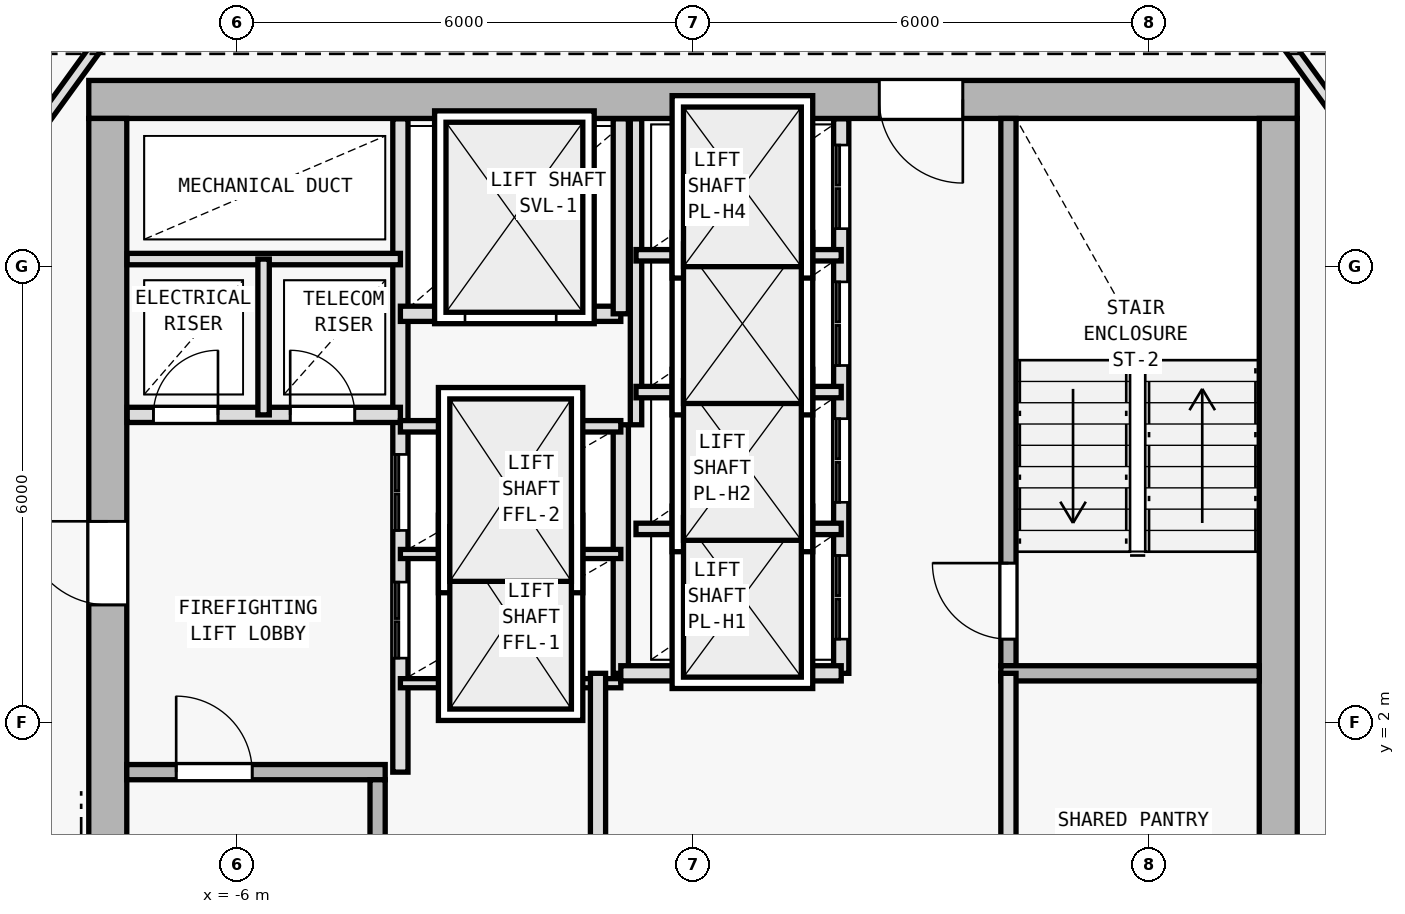
"""IFC4 building model, lengths in metres.
Left out: names, types, materials, properties, quantities, classifications, styles, units other than length and angle.
Written with IfcOpenShell. Run it as: python <this file> out.ifc"""

import sys

from ifc_helpers import new_model, si_unit, direction, frame, frame_2d, origin, origin_2d, place, context, subcontext, project, spatial, rectangle, i_section, extrude, element, fill, save


model = new_model("IFC4")
c1 = context("Model", 3, precision=1e-05, world=origin(), true_north=direction((0.0, 1.0)))
c2 = subcontext(c1, "Body", "Model", "MODEL_VIEW")
j1 = project(units=[si_unit("LENGTHUNIT", "METRE"), si_unit("PLANEANGLEUNIT", "RADIAN")], contexts=[c1])
p1 = place(None, origin())
s1 = spatial("IfcSite", under=j1, at=p1, CompositionType="ELEMENT")
p2 = place(p1, origin())
s2 = spatial("IfcBuilding", under=s1, at=p2, CompositionType="ELEMENT")
p3 = place(p2, frame((0.0, 0.0, 294.0)))
s3 = spatial("IfcBuildingStorey", under=s2, at=p3, CompositionType="ELEMENT", Elevation=294.0)
for number, where, z_axis, x_axis in (
    (1, (7.7, 10.2, 0.0), (0.0, 0.0, 1.0), (1.0, 0.0, 0.0)),
    (2, (-7.7, 10.2, 0.0), (0.0, 0.0, 1.0), (1.0, 0.0, 0.0)),
    (3, (7.7, 0.4, 0.0), (0.0, 0.0, 1.0), (1.0, 0.0, 0.0)),
    (4, (-7.7, 2.0, 0.0), (0.0, 0.0, 1.0), (1.0, 0.0, 0.0)),
):
    element("IfcColumn", number, at=place(p3, frame(where, z_axis=z_axis, x_axis=x_axis)), inside=s3, PredefinedType="COLUMN", context=c2, shape_type="SweptSolid", body=[
        extrude(i_section(OverallWidth=0.374, OverallDepth=0.372, WebThickness=0.012, FlangeThickness=0.02, FilletRadius=0.015, at=origin_2d()), origin(), (0.0, 0.0, 1.0), 3.6),
    ])
p4 = place(p3, frame((7.95, 10.2, 0.0), z_axis=(0.0, 0.0, 1.0), x_axis=(-1.0, 0.0, 0.0)))
e5 = element("IfcWall", 5, at=p4, inside=s3, PredefinedType="SHEAR", context=c2, shape_type="SweptSolid", body=[
    extrude(rectangle(XDim=15.9, YDim=0.5, at=frame_2d((7.95, 0.0))), origin(), (0.0, 0.0, 1.0), 3.34),
])
p5 = place(p4, frame((4.4, 0.0, 0.0)))
e6 = element("IfcOpeningElement", 6, at=p5, cuts=e5, PredefinedType="OPENING", context=c2, shape_type="SweptSolid", body=[
    extrude(rectangle(XDim=1.1, YDim=2.15, at=frame_2d((0.55, 1.075))), frame((0.0, 0.26, 0.0), z_axis=(0.0, -1.0, 0.0), x_axis=(1.0, 0.0, 0.0)), (0.0, 0.0, 1.0), 0.52),
])
p6 = place(p3, frame((-7.7, -9.15, 0.0), z_axis=(0.0, 0.0, 1.0), x_axis=(0.0, 1.0, 0.0)))
e7 = element("IfcWall", 7, at=p6, inside=s3, PredefinedType="SHEAR", context=c2, shape_type="SweptSolid", body=[
    extrude(rectangle(XDim=19.1, YDim=0.5, at=frame_2d((9.55, 0.0))), origin(), (0.0, 0.0, 1.0), 3.34),
])
p7 = place(p6, frame((12.7, 0.0, 0.0)))
e8 = element("IfcOpeningElement", 8, at=p7, cuts=e7, PredefinedType="OPENING", context=c2, shape_type="SweptSolid", body=[
    extrude(rectangle(XDim=1.1, YDim=2.15, at=frame_2d((0.55, 1.075))), frame((0.0, 0.26, 0.0), z_axis=(0.0, -1.0, 0.0), x_axis=(1.0, 0.0, 0.0)), (0.0, 0.0, 1.0), 0.52),
])
p8 = place(p3, frame((7.7, 9.95, 0.0), z_axis=(0.0, 0.0, 1.0), x_axis=(0.0, -1.0, 0.0)))
e9 = element("IfcWall", 9, at=p8, inside=s3, PredefinedType="SHEAR", context=c2, shape_type="SweptSolid", body=[
    extrude(rectangle(XDim=19.1, YDim=0.5, at=frame_2d((9.55, 0.0))), origin(), (0.0, 0.0, 1.0), 3.34),
])
p9 = place(p3, frame((-7.45, 1.35, 0.0), z_axis=(0.0, 0.0, 1.0), x_axis=(1.0, 0.0, 0.0)))
e10 = element("IfcWall", 10, at=p9, inside=s3, PredefinedType="SOLIDWALL", context=c2, shape_type="SweptSolid", body=[
    extrude(rectangle(XDim=3.4, YDim=0.2, at=frame_2d((1.7, 0.0))), origin(), (0.0, 0.0, 1.0), 3.34),
])
p10 = place(p9, frame((0.65, 0.0, 0.0)))
e11 = element("IfcOpeningElement", 11, at=p10, cuts=e10, PredefinedType="OPENING", context=c2, shape_type="SweptSolid", body=[
    extrude(rectangle(XDim=1.0, YDim=2.15, at=frame_2d((0.5, 1.075))), frame((0.0, 0.11, 0.0), z_axis=(0.0, -1.0, 0.0), x_axis=(1.0, 0.0, 0.0)), (0.0, 0.0, 1.0), 0.22),
])
p11 = place(p3, frame((-4.15, -5.95, 0.0), z_axis=(0.0, 0.0, 1.0), x_axis=(0.0, 1.0, 0.0)))
e12 = element("IfcWall", 12, at=p11, inside=s3, PredefinedType="SOLIDWALL", context=c2, shape_type="SweptSolid", body=[
    extrude(rectangle(XDim=7.2, YDim=0.2, at=frame_2d((3.6, 0.0))), origin(), (0.0, 0.0, 1.0), 3.34),
])
p12 = place(p3, frame((-3.85, 1.35, 0.0), z_axis=(0.0, 0.0, 1.0), x_axis=(0.0, 1.0, 0.0)))
e13 = element("IfcWall", 13, at=p12, inside=s3, PredefinedType="SOLIDWALL", context=c2, shape_type="SweptSolid", body=[
    extrude(rectangle(XDim=8.595, YDim=0.2, at=frame_2d((4.297, 0.0))), origin(), (0.0, 0.0, 1.0), 3.34),
])
p13 = place(p12, frame((1.5, 0.0, 0.0)))
e14 = element("IfcOpeningElement", 14, at=p13, cuts=e13, PredefinedType="OPENING", context=c2, shape_type="SweptSolid", body=[
    extrude(rectangle(XDim=1.0, YDim=2.15, at=frame_2d((0.5, 1.075))), frame((0.0, 0.11, 0.0), z_axis=(0.0, -1.0, 0.0), x_axis=(1.0, 0.0, 0.0)), (0.0, 0.0, 1.0), 0.22),
])
p14 = place(p12, frame((3.18, 0.0, 0.0)))
e15 = element("IfcOpeningElement", 15, at=p14, cuts=e13, PredefinedType="OPENING", context=c2, shape_type="SweptSolid", body=[
    extrude(rectangle(XDim=1.0, YDim=2.15, at=frame_2d((0.5, 1.075))), frame((0.0, 0.11, 0.0), z_axis=(0.0, -1.0, 0.0), x_axis=(1.0, 0.0, 0.0)), (0.0, 0.0, 1.0), 0.22),
])
p15 = place(p3, frame((-7.445, 6.05, 0.0), z_axis=(0.0, 0.0, 1.0), x_axis=(1.0, 0.0, 0.0)))
e16 = element("IfcWall", 16, at=p15, inside=s3, PredefinedType="SOLIDWALL", context=c2, shape_type="SweptSolid", body=[
    extrude(rectangle(XDim=3.595, YDim=0.2, at=frame_2d((1.797, 0.0))), origin(), (0.0, 0.0, 1.0), 3.34),
])
p16 = place(p15, frame((0.345, 0.0, 0.0)))
e17 = element("IfcOpeningElement", 17, at=p16, cuts=e16, PredefinedType="OPENING", context=c2, shape_type="SweptSolid", body=[
    extrude(rectangle(XDim=0.85, YDim=2.1, at=frame_2d((0.425, 1.05))), frame((0.0, 0.11, 0.0), z_axis=(0.0, -1.0, 0.0), x_axis=(1.0, 0.0, 0.0)), (0.0, 0.0, 1.0), 0.22),
])
p17 = place(p15, frame((2.145, 0.0, 0.0)))
e18 = element("IfcOpeningElement", 18, at=p17, cuts=e16, PredefinedType="OPENING", context=c2, shape_type="SweptSolid", body=[
    extrude(rectangle(XDim=0.85, YDim=2.1, at=frame_2d((0.425, 1.05))), frame((0.0, 0.11, 0.0), z_axis=(0.0, -1.0, 0.0), x_axis=(1.0, 0.0, 0.0)), (0.0, 0.0, 1.0), 0.22),
])
p18 = place(p3, frame((-7.445, 8.1, 0.0), z_axis=(0.0, 0.0, 1.0), x_axis=(1.0, 0.0, 0.0)))
e19 = element("IfcWall", 19, at=p18, inside=s3, PredefinedType="PARTITIONING", context=c2, shape_type="SweptSolid", body=[
    extrude(rectangle(XDim=3.595, YDim=0.15, at=frame_2d((1.797, 0.0))), origin(), (0.0, 0.0, 1.0), 3.34),
])
p19 = place(p3, frame((-5.65, 6.05, 0.0), z_axis=(0.0, 0.0, 1.0), x_axis=(0.0, 1.0, 0.0)))
e20 = element("IfcWall", 20, at=p19, inside=s3, PredefinedType="PARTITIONING", context=c2, shape_type="SweptSolid", body=[
    extrude(rectangle(XDim=2.05, YDim=0.15, at=frame_2d((1.025, 0.0))), origin(), (0.0, 0.0, 1.0), 3.34),
])
p20 = place(p3, frame((4.15, 2.75, 0.0), z_axis=(0.0, 0.0, 1.0), x_axis=(0.0, 1.0, 0.0)))
e21 = element("IfcWall", 21, at=p20, inside=s3, PredefinedType="SOLIDWALL", context=c2, shape_type="SweptSolid", body=[
    extrude(rectangle(XDim=7.2, YDim=0.2, at=frame_2d((3.6, 0.0))), origin(), (0.0, 0.0, 1.0), 3.34),
])
p21 = place(p20, frame((0.35, 0.0, 0.0)))
e22 = element("IfcOpeningElement", 22, at=p21, cuts=e21, PredefinedType="OPENING", context=c2, shape_type="SweptSolid", body=[
    extrude(rectangle(XDim=1.0, YDim=2.15, at=frame_2d((0.5, 1.075))), frame((0.0, 0.11, 0.0), z_axis=(0.0, -1.0, 0.0), x_axis=(1.0, 0.0, 0.0)), (0.0, 0.0, 1.0), 0.22),
])
p22 = place(p3, frame((4.05, 2.65, 0.0), z_axis=(0.0, 0.0, 1.0), x_axis=(1.0, 0.0, 0.0)))
e23 = element("IfcWall", 23, at=p22, inside=s3, PredefinedType="SOLIDWALL", context=c2, shape_type="SweptSolid", body=[
    extrude(rectangle(XDim=3.4, YDim=0.2, at=frame_2d((1.7, 0.0))), origin(), (0.0, 0.0, 1.0), 3.34),
])
p23 = place(p3, frame((-0.95, 2.65, 0.0), z_axis=(0.0, 0.0, 1.0), x_axis=(0.0, 1.0, 0.0)))
e24 = element("IfcWall", 24, at=p23, inside=s3, PredefinedType="SOLIDWALL", context=c2, shape_type="SweptSolid", body=[
    extrude(rectangle(XDim=3.27, YDim=0.2, at=frame_2d((1.635, 0.0))), origin(), (0.0, 0.0, 1.0), 3.34),
])
for number, where, z_axis, x_axis in (
    (25, (-3.85, 2.52, 0.0), (0.0, 0.0, 1.0), (1.0, 0.0, 0.0)),
    (26, (-3.85, 4.22, 0.0), (0.0, 0.0, 1.0), (1.0, 0.0, 0.0)),
):
    element("IfcWall", number, at=place(p3, frame(where, z_axis=z_axis, x_axis=x_axis)), inside=s3, PredefinedType="PARTITIONING", context=c2, shape_type="SweptSolid", body=[
        extrude(rectangle(XDim=2.9, YDim=0.12, at=frame_2d((1.45, 0.0))), origin(), (0.0, 0.0, 1.0), 3.34),
    ])
p24 = place(p3, frame((-3.85, 5.9, 0.0), z_axis=(0.0, 0.0, 1.0), x_axis=(1.0, 0.0, 0.0)))
e27 = element("IfcWall", 27, at=p24, inside=s3, PredefinedType="PARTITIONING", context=c2, shape_type="SweptSolid", body=[
    extrude(rectangle(XDim=2.9, YDim=0.15, at=frame_2d((1.45, 0.0))), origin(), (0.0, 0.0, 1.0), 3.34),
])
p25 = place(p3, frame((-3.85, 7.38, 0.0), z_axis=(0.0, 0.0, 1.0), x_axis=(1.0, 0.0, 0.0)))
e28 = element("IfcWall", 28, at=p25, inside=s3, PredefinedType="SOLIDWALL", context=c2, shape_type="SweptSolid", body=[
    extrude(rectangle(XDim=2.9, YDim=0.2, at=frame_2d((1.45, 0.0))), origin(), (0.0, 0.0, 1.0), 3.34),
])
p26 = place(p25, frame((0.85, 0.0, 0.0)))
e29 = element("IfcOpeningElement", 29, at=p26, cuts=e28, PredefinedType="OPENING", context=c2, shape_type="SweptSolid", body=[
    extrude(rectangle(XDim=1.2, YDim=2.2, at=frame_2d((0.6, 1.1))), frame((0.0, 0.11, 0.0), z_axis=(0.0, -1.0, 0.0), x_axis=(1.0, 0.0, 0.0)), (0.0, 0.0, 1.0), 0.22),
])
p27 = place(p3, frame((-0.95, 7.38, 0.0), z_axis=(0.0, 0.0, 1.0), x_axis=(0.0, 1.0, 0.0)))
e30 = element("IfcWall", 30, at=p27, inside=s3, PredefinedType="SOLIDWALL", context=c2, shape_type="SweptSolid", body=[
    extrude(rectangle(XDim=2.565, YDim=0.2, at=frame_2d((1.283, 0.0))), origin(), (0.0, 0.0, 1.0), 3.34),
])
p28 = place(p3, frame((4.15, -6.05, 0.0), z_axis=(0.0, 0.0, 1.0), x_axis=(0.0, 1.0, 0.0)))
e31 = element("IfcWall", 31, at=p28, inside=s3, PredefinedType="SOLIDWALL", context=c2, shape_type="SweptSolid", body=[
    extrude(rectangle(XDim=8.7, YDim=0.2, at=frame_2d((4.35, 0.0))), origin(), (0.0, 0.0, 1.0), 3.34),
])
p29 = place(p28, frame((3.6, 0.0, 0.0)))
e32 = element("IfcOpeningElement", 32, at=p29, cuts=e31, PredefinedType="OPENING", context=c2, shape_type="SweptSolid", body=[
    extrude(rectangle(XDim=0.95, YDim=2.1, at=frame_2d((0.475, 1.05))), frame((0.0, 0.11, 0.0), z_axis=(0.0, -1.0, 0.0), x_axis=(1.0, 0.0, 0.0)), (0.0, 0.0, 1.0), 0.22),
])
p30 = place(p3, frame((-1.25, -6.05, 0.0), z_axis=(0.0, 0.0, 1.0), x_axis=(0.0, 1.0, 0.0)))
e33 = element("IfcWall", 33, at=p30, inside=s3, PredefinedType="SOLIDWALL", context=c2, shape_type="SweptSolid", body=[
    extrude(rectangle(XDim=8.7, YDim=0.2, at=frame_2d((4.35, 0.0))), origin(), (0.0, 0.0, 1.0), 3.34),
])
p31 = place(p30, frame((3.4, 0.0, 0.0)))
e34 = element("IfcOpeningElement", 34, at=p31, cuts=e33, PredefinedType="OPENING", context=c2, shape_type="SweptSolid", body=[
    extrude(rectangle(XDim=0.95, YDim=2.1, at=frame_2d((0.475, 1.05))), frame((0.0, 0.11, 0.0), z_axis=(0.0, -1.0, 0.0), x_axis=(1.0, 0.0, 0.0)), (0.0, 0.0, 1.0), 0.22),
])
p32 = place(p3, frame((1.95, 2.65, 0.0), z_axis=(0.0, 0.0, 1.0), x_axis=(0.0, 1.0, 0.0)))
e35 = element("IfcWall", 35, at=p32, inside=s3, PredefinedType="SOLIDWALL", context=c2, shape_type="SweptSolid", body=[
    extrude(rectangle(XDim=7.295, YDim=0.2, at=frame_2d((3.647, 0.0))), origin(), (0.0, 0.0, 1.0), 3.34),
])
p33 = place(p32, frame((0.45, 0.0, 0.0)))
e36 = element("IfcOpeningElement", 36, at=p33, cuts=e35, PredefinedType="OPENING", context=c2, shape_type="SweptSolid", body=[
    extrude(rectangle(XDim=1.1, YDim=2.15, at=frame_2d((0.55, 1.075))), frame((0.0, 0.11, 0.0), z_axis=(0.0, -1.0, 0.0), x_axis=(1.0, 0.0, 0.0)), (0.0, 0.0, 1.0), 0.22),
])
p34 = place(p32, frame((2.25, 0.0, 0.0)))
e37 = element("IfcOpeningElement", 37, at=p34, cuts=e35, PredefinedType="OPENING", context=c2, shape_type="SweptSolid", body=[
    extrude(rectangle(XDim=1.1, YDim=2.15, at=frame_2d((0.55, 1.075))), frame((0.0, 0.11, 0.0), z_axis=(0.0, -1.0, 0.0), x_axis=(1.0, 0.0, 0.0)), (0.0, 0.0, 1.0), 0.22),
])
p35 = place(p32, frame((4.05, 0.0, 0.0)))
e38 = element("IfcOpeningElement", 38, at=p35, cuts=e35, PredefinedType="OPENING", context=c2, shape_type="SweptSolid", body=[
    extrude(rectangle(XDim=1.1, YDim=2.15, at=frame_2d((0.55, 1.075))), frame((0.0, 0.11, 0.0), z_axis=(0.0, -1.0, 0.0), x_axis=(1.0, 0.0, 0.0)), (0.0, 0.0, 1.0), 0.22),
])
p36 = place(p32, frame((5.85, 0.0, 0.0)))
e39 = element("IfcOpeningElement", 39, at=p36, cuts=e35, PredefinedType="OPENING", context=c2, shape_type="SweptSolid", body=[
    extrude(rectangle(XDim=1.1, YDim=2.15, at=frame_2d((0.55, 1.075))), frame((0.0, 0.11, 0.0), z_axis=(0.0, -1.0, 0.0), x_axis=(1.0, 0.0, 0.0)), (0.0, 0.0, 1.0), 0.22),
])
p37 = place(p3, frame((-0.95, 2.65, 0.0), z_axis=(0.0, 0.0, 1.0), x_axis=(1.0, 0.0, 0.0)))
e40 = element("IfcWall", 40, at=p37, inside=s3, PredefinedType="SOLIDWALL", context=c2, shape_type="SweptSolid", body=[
    extrude(rectangle(XDim=2.9, YDim=0.2, at=frame_2d((1.45, 0.0))), origin(), (0.0, 0.0, 1.0), 3.34),
])
p38 = place(p3, frame((-0.75, 5.92, 0.0), z_axis=(0.0, 0.0, 1.0), x_axis=(0.0, 1.0, 0.0)))
e41 = element("IfcWall", 41, at=p38, inside=s3, PredefinedType="PARTITIONING", context=c2, shape_type="SweptSolid", body=[
    extrude(rectangle(XDim=4.025, YDim=0.15, at=frame_2d((2.013, 0.0))), origin(), (0.0, 0.0, 1.0), 3.34),
])
for number, where, z_axis, x_axis in (
    (42, (-0.75, 4.55, 0.0), (0.0, 0.0, 1.0), (1.0, 0.0, 0.0)),
    (43, (-0.75, 6.35, 0.0), (0.0, 0.0, 1.0), (1.0, 0.0, 0.0)),
    (44, (-0.75, 8.15, 0.0), (0.0, 0.0, 1.0), (1.0, 0.0, 0.0)),
):
    element("IfcWall", number, at=place(p3, frame(where, z_axis=z_axis, x_axis=x_axis)), inside=s3, PredefinedType="PARTITIONING", context=c2, shape_type="SweptSolid", body=[
        extrude(rectangle(XDim=2.7, YDim=0.15, at=frame_2d((1.35, 0.0))), origin(), (0.0, 0.0, 1.0), 3.34),
    ])
p39 = place(p3, frame((-9.78, 8.226, 0.0), z_axis=(0.0, 0.0, 1.0), x_axis=(0.586956386413, 0.809618552436, 0.0)))
e45 = element("IfcWall", 45, at=p39, inside=s3, PredefinedType="PARTITIONING", context=c2, shape_type="SweptSolid", body=[
    extrude(rectangle(XDim=5.008, YDim=0.15, at=frame_2d((2.504, 0.0))), origin(), (0.0, 0.0, 1.0), 3.005),
])
p40 = place(p3, frame((6.841, 12.28, 0.0), z_axis=(0.0, 0.0, 1.0), x_axis=(0.586956386413, -0.809618552436, 0.0)))
e46 = element("IfcWall", 46, at=p40, inside=s3, PredefinedType="PARTITIONING", context=c2, shape_type="SweptSolid", body=[
    extrude(rectangle(XDim=5.008, YDim=0.15, at=frame_2d((2.504, 0.0))), origin(), (0.0, 0.0, 1.0), 2.915),
])
p41 = place(p7, origin())
e47 = element("IfcDoor", 47, at=p41, inside=s3, OperationType="SINGLE_SWING_RIGHT", PredefinedType="DOOR", context=c2, shape_type="SweptSolid", body=[
    extrude(rectangle(XDim=1.1, YDim=2.15, at=frame_2d((0.55, 1.075))), frame((0.0, 0.025, 0.0), z_axis=(0.0, -1.0, 0.0), x_axis=(1.0, 0.0, 0.0)), (0.0, 0.0, 1.0), 0.05),
])
fill(e8, e47)
p42 = place(p5, origin())
e48 = element("IfcDoor", 48, at=p42, inside=s3, OperationType="SINGLE_SWING_LEFT", PredefinedType="DOOR", context=c2, shape_type="SweptSolid", body=[
    extrude(rectangle(XDim=1.1, YDim=2.15, at=frame_2d((0.55, 1.075))), frame((0.0, 0.025, 0.0), z_axis=(0.0, -1.0, 0.0), x_axis=(1.0, 0.0, 0.0)), (0.0, 0.0, 1.0), 0.05),
])
fill(e6, e48)
p43 = place(p10, origin())
e49 = element("IfcDoor", 49, at=p43, inside=s3, OperationType="SINGLE_SWING_LEFT", PredefinedType="DOOR", context=c2, shape_type="SweptSolid", body=[
    extrude(rectangle(XDim=1.0, YDim=2.15, at=frame_2d((0.5, 1.075))), frame((0.0, 0.025, 0.0), z_axis=(0.0, -1.0, 0.0), x_axis=(1.0, 0.0, 0.0)), (0.0, 0.0, 1.0), 0.05),
])
fill(e11, e49)
p44 = place(p16, origin())
e50 = element("IfcDoor", 50, at=p44, inside=s3, OperationType="SINGLE_SWING_RIGHT", PredefinedType="DOOR", context=c2, shape_type="SweptSolid", body=[
    extrude(rectangle(XDim=0.85, YDim=2.1, at=frame_2d((0.425, 1.05))), frame((0.0, 0.025, 0.0), z_axis=(0.0, -1.0, 0.0), x_axis=(1.0, 0.0, 0.0)), (0.0, 0.0, 1.0), 0.05),
])
fill(e17, e50)
p45 = place(p17, origin())
e51 = element("IfcDoor", 51, at=p45, inside=s3, OperationType="SINGLE_SWING_LEFT", PredefinedType="DOOR", context=c2, shape_type="SweptSolid", body=[
    extrude(rectangle(XDim=0.85, YDim=2.1, at=frame_2d((0.425, 1.05))), frame((0.0, 0.025, 0.0), z_axis=(0.0, -1.0, 0.0), x_axis=(1.0, 0.0, 0.0)), (0.0, 0.0, 1.0), 0.05),
])
fill(e18, e51)
p46 = place(p21, origin())
e52 = element("IfcDoor", 52, at=p46, inside=s3, OperationType="SINGLE_SWING_RIGHT", PredefinedType="DOOR", context=c2, shape_type="SweptSolid", body=[
    extrude(rectangle(XDim=1.0, YDim=2.15, at=frame_2d((0.5, 1.075))), frame((0.0, 0.025, 0.0), z_axis=(0.0, -1.0, 0.0), x_axis=(1.0, 0.0, 0.0)), (0.0, 0.0, 1.0), 0.05),
])
fill(e22, e52)
p47 = place(p26, origin())
e53 = element("IfcDoor", 53, at=p47, inside=s3, OperationType="DOUBLE_DOOR_SLIDING", PredefinedType="DOOR", context=c2, shape_type="SweptSolid", body=[
    extrude(rectangle(XDim=1.2, YDim=2.2, at=frame_2d((0.6, 1.1))), frame((0.0, 0.025, 0.0), z_axis=(0.0, -1.0, 0.0), x_axis=(1.0, 0.0, 0.0)), (0.0, 0.0, 1.0), 0.05),
])
fill(e29, e53)
p48 = place(p33, origin())
e54 = element("IfcDoor", 54, at=p48, inside=s3, OperationType="DOUBLE_DOOR_SLIDING", PredefinedType="DOOR", context=c2, shape_type="SweptSolid", body=[
    extrude(rectangle(XDim=1.1, YDim=2.15, at=frame_2d((0.55, 1.075))), frame((0.0, 0.025, 0.0), z_axis=(0.0, -1.0, 0.0), x_axis=(1.0, 0.0, 0.0)), (0.0, 0.0, 1.0), 0.05),
])
fill(e36, e54)
p49 = place(p34, origin())
e55 = element("IfcDoor", 55, at=p49, inside=s3, OperationType="DOUBLE_DOOR_SLIDING", PredefinedType="DOOR", context=c2, shape_type="SweptSolid", body=[
    extrude(rectangle(XDim=1.1, YDim=2.15, at=frame_2d((0.55, 1.075))), frame((0.0, 0.025, 0.0), z_axis=(0.0, -1.0, 0.0), x_axis=(1.0, 0.0, 0.0)), (0.0, 0.0, 1.0), 0.05),
])
fill(e37, e55)
p50 = place(p35, origin())
e56 = element("IfcDoor", 56, at=p50, inside=s3, OperationType="DOUBLE_DOOR_SLIDING", PredefinedType="DOOR", context=c2, shape_type="SweptSolid", body=[
    extrude(rectangle(XDim=1.1, YDim=2.15, at=frame_2d((0.55, 1.075))), frame((0.0, 0.025, 0.0), z_axis=(0.0, -1.0, 0.0), x_axis=(1.0, 0.0, 0.0)), (0.0, 0.0, 1.0), 0.05),
])
fill(e38, e56)
p51 = place(p36, origin())
e57 = element("IfcDoor", 57, at=p51, inside=s3, OperationType="DOUBLE_DOOR_SLIDING", PredefinedType="DOOR", context=c2, shape_type="SweptSolid", body=[
    extrude(rectangle(XDim=1.1, YDim=2.15, at=frame_2d((0.55, 1.075))), frame((0.0, 0.025, 0.0), z_axis=(0.0, -1.0, 0.0), x_axis=(1.0, 0.0, 0.0)), (0.0, 0.0, 1.0), 0.05),
])
fill(e39, e57)
p52 = place(p13, origin())
e58 = element("IfcDoor", 58, at=p52, inside=s3, OperationType="DOUBLE_DOOR_SLIDING", PredefinedType="DOOR", context=c2, shape_type="SweptSolid", body=[
    extrude(rectangle(XDim=1.0, YDim=2.15, at=frame_2d((0.5, 1.075))), frame((0.0, 0.025, 0.0), z_axis=(0.0, -1.0, 0.0), x_axis=(1.0, 0.0, 0.0)), (0.0, 0.0, 1.0), 0.05),
])
fill(e14, e58)
p53 = place(p14, origin())
e59 = element("IfcDoor", 59, at=p53, inside=s3, OperationType="DOUBLE_DOOR_SLIDING", PredefinedType="DOOR", context=c2, shape_type="SweptSolid", body=[
    extrude(rectangle(XDim=1.0, YDim=2.15, at=frame_2d((0.5, 1.075))), frame((0.0, 0.025, 0.0), z_axis=(0.0, -1.0, 0.0), x_axis=(1.0, 0.0, 0.0)), (0.0, 0.0, 1.0), 0.05),
])
fill(e15, e59)
save(model, sys.argv[1])
